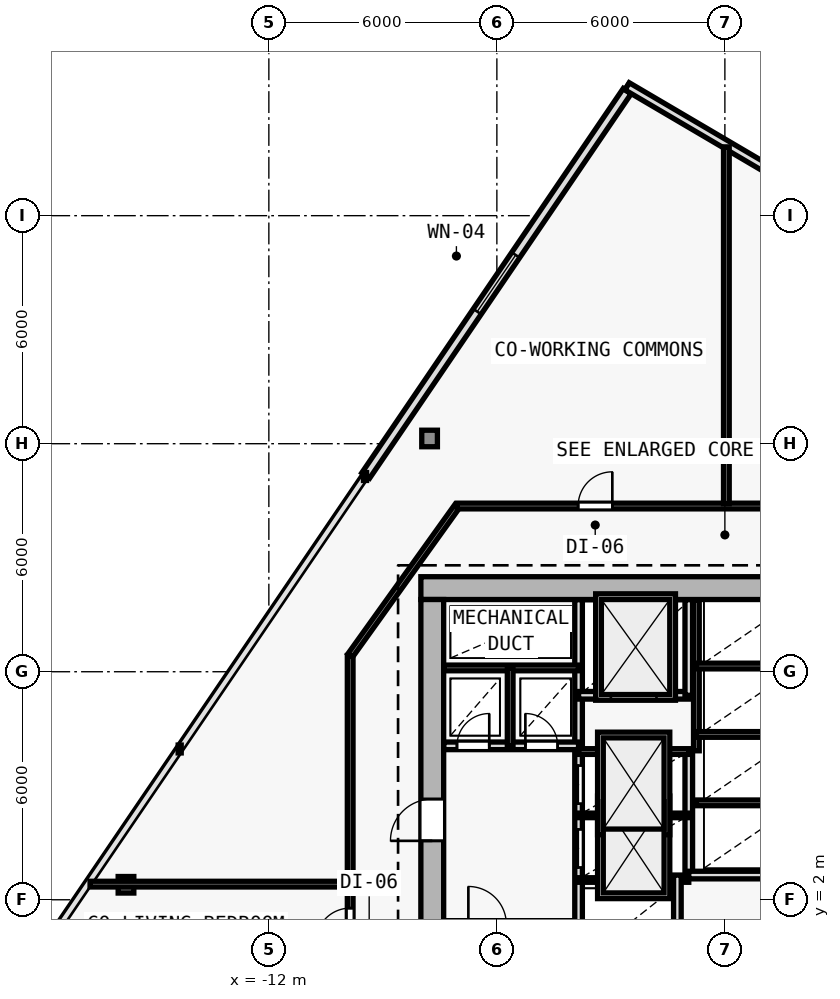
"""IFC4 building model, lengths in metres.
Left out: names, types, materials, properties, quantities, classifications, styles, units other than length and angle.
Written with IfcOpenShell. Run it as: python <this file> out.ifc"""

import sys

from ifc_helpers import new_model, si_unit, direction, frame, frame_2d, origin, origin_2d, place, context, subcontext, project, spatial, rectangle, i_section, extrude, element, fill, save


model = new_model("IFC4")
c1 = context("Model", 3, precision=1e-05, world=origin(), true_north=direction((0.0, 1.0)))
c2 = subcontext(c1, "Body", "Model", "MODEL_VIEW")
j1 = project(units=[si_unit("LENGTHUNIT", "METRE"), si_unit("PLANEANGLEUNIT", "RADIAN")], contexts=[c1])
p1 = place(None, origin())
s1 = spatial("IfcSite", under=j1, at=p1, CompositionType="ELEMENT")
p2 = place(p1, origin())
s2 = spatial("IfcBuilding", under=s1, at=p2, CompositionType="ELEMENT")
p3 = place(p2, frame((0.0, 0.0, 51.6)))
s3 = spatial("IfcBuildingStorey", under=s2, at=p3, CompositionType="ELEMENT", Elevation=51.6)
for number, where, z_axis, x_axis in (
    (1, (-7.7, 10.2, 0.0), (0.0, 0.0, 1.0), (1.0, 0.0, 0.0)),
    (2, (-7.7, 2.0, 0.0), (0.0, 0.0, 1.0), (1.0, 0.0, 0.0)),
):
    element("IfcColumn", number, at=place(p3, frame(where, z_axis=z_axis, x_axis=x_axis)), inside=s3, PredefinedType="COLUMN", context=c2, shape_type="SweptSolid", body=[
        extrude(i_section(OverallWidth=0.416, OverallDepth=0.446, WebThickness=0.025, FlangeThickness=0.04, FilletRadius=0.015, at=origin_2d()), origin(), (0.0, 0.0, 1.0), 3.6),
    ])
p4 = place(p3, frame((-7.771, 14.137, 0.005), z_axis=(0.008842562123, -0.00251672922, 0.999957736691), x_axis=(0.273743828055, 0.961802639112, 0.0)))
e3 = element("IfcColumn", 3, at=p4, inside=s3, PredefinedType="COLUMN", context=c2, shape_type="SweptSolid", body=[
    extrude(i_section(OverallWidth=0.412, OverallDepth=0.435, WebThickness=0.023, FlangeThickness=0.037, FilletRadius=0.015, at=origin_2d()), origin(), (0.0, 0.0, 1.0), 3.589),
])
p5 = place(p3, frame((-15.759, 2.394, 0.005), z_axis=(0.017002405671, 0.009589356798, 0.999809463067), x_axis=(-0.491253415567, 0.871016694268, 0.0)))
e4 = element("IfcColumn", 4, at=p5, inside=s3, PredefinedType="COLUMN", context=c2, shape_type="SweptSolid", body=[
    extrude(i_section(OverallWidth=0.412, OverallDepth=0.435, WebThickness=0.023, FlangeThickness=0.037, FilletRadius=0.015, at=origin_2d()), origin(), (0.0, 0.0, 1.0), 3.59),
])
p6 = place(p3, frame((-9.451, 13.163, 0.0), z_axis=(0.0, 0.0, 1.0), x_axis=(0.562478152622, 0.826812147844, 0.0)))
e5 = element("IfcWall", 5, at=p6, inside=s3, PredefinedType="SOLIDWALL", context=c2, shape_type="SweptSolid", body=[
    extrude(rectangle(XDim=12.232, YDim=0.25, at=frame_2d((6.116, 0.0))), origin(), (0.0, 0.0, 1.0), 3.35),
])
p7 = place(p6, frame((5.216, 0.0, 0.62)))
e6 = element("IfcOpeningElement", 6, at=p7, cuts=e5, PredefinedType="OPENING", context=c2, shape_type="SweptSolid", body=[
    extrude(rectangle(XDim=1.8, YDim=2.1, at=frame_2d((0.9, 1.05))), frame((0.0, 0.135, 0.0), z_axis=(0.0, -1.0, 0.0), x_axis=(1.0, 0.0, 0.0)), (0.0, 0.0, 1.0), 0.27),
])
p8 = place(p3, frame((-2.572, 23.403, 0.0), z_axis=(0.0, 0.0, 1.0), x_axis=(0.862137551275, -0.506674296449, 0.0)))
e7 = element("IfcWall", 7, at=p8, inside=s3, PredefinedType="SOLIDWALL", context=c2, shape_type="SweptSolid", body=[
    extrude(rectangle(XDim=5.307, YDim=0.22, at=frame_2d((2.654, 0.0))), origin(), (0.0, 0.0, 1.0), 3.35),
])
p9 = place(p3, frame((8.0, 10.2, 0.0), z_axis=(0.0, 0.0, 1.0), x_axis=(-1.0, 0.0, 0.0)))
e8 = element("IfcWall", 8, at=p9, inside=s3, PredefinedType="SHEAR", context=c2, shape_type="SweptSolid", body=[
    extrude(rectangle(XDim=16.0, YDim=0.6, at=frame_2d((8.0, 0.0))), origin(), (0.0, 0.0, 1.0), 3.35),
])
p10 = place(p9, frame((4.45, 0.0, 0.0)))
e9 = element("IfcOpeningElement", 9, at=p10, cuts=e8, PredefinedType="OPENING", context=c2, shape_type="SweptSolid", body=[
    extrude(rectangle(XDim=1.1, YDim=2.15, at=frame_2d((0.55, 1.075))), frame((0.0, 0.31, 0.0), z_axis=(0.0, -1.0, 0.0), x_axis=(1.0, 0.0, 0.0)), (0.0, 0.0, 1.0), 0.62),
])
p11 = place(p3, frame((-7.7, -9.1, 0.0), z_axis=(0.0, 0.0, 1.0), x_axis=(0.0, 1.0, 0.0)))
e10 = element("IfcWall", 10, at=p11, inside=s3, PredefinedType="SHEAR", context=c2, shape_type="SweptSolid", body=[
    extrude(rectangle(XDim=19.0, YDim=0.6, at=frame_2d((9.5, 0.0))), origin(), (0.0, 0.0, 1.0), 3.35),
])
p12 = place(p11, frame((12.65, 0.0, 0.0)))
e11 = element("IfcOpeningElement", 11, at=p12, cuts=e10, PredefinedType="OPENING", context=c2, shape_type="SweptSolid", body=[
    extrude(rectangle(XDim=1.1, YDim=2.15, at=frame_2d((0.55, 1.075))), frame((0.0, 0.31, 0.0), z_axis=(0.0, -1.0, 0.0), x_axis=(1.0, 0.0, 0.0)), (0.0, 0.0, 1.0), 0.62),
])
p13 = place(p3, frame((-3.85, 1.35, 0.0), z_axis=(0.0, 0.0, 1.0), x_axis=(0.0, 1.0, 0.0)))
e12 = element("IfcWall", 12, at=p13, inside=s3, PredefinedType="SOLIDWALL", context=c2, shape_type="SweptSolid", body=[
    extrude(rectangle(XDim=8.545, YDim=0.2, at=frame_2d((4.272, 0.0))), origin(), (0.0, 0.0, 1.0), 3.35),
])
p14 = place(p13, frame((1.5, 0.0, 0.0)))
e13 = element("IfcOpeningElement", 13, at=p14, cuts=e12, PredefinedType="OPENING", context=c2, shape_type="SweptSolid", body=[
    extrude(rectangle(XDim=1.0, YDim=2.15, at=frame_2d((0.5, 1.075))), frame((0.0, 0.11, 0.0), z_axis=(0.0, -1.0, 0.0), x_axis=(1.0, 0.0, 0.0)), (0.0, 0.0, 1.0), 0.22),
])
p15 = place(p13, frame((3.18, 0.0, 0.0)))
e14 = element("IfcOpeningElement", 14, at=p15, cuts=e12, PredefinedType="OPENING", context=c2, shape_type="SweptSolid", body=[
    extrude(rectangle(XDim=1.0, YDim=2.15, at=frame_2d((0.5, 1.075))), frame((0.0, 0.11, 0.0), z_axis=(0.0, -1.0, 0.0), x_axis=(1.0, 0.0, 0.0)), (0.0, 0.0, 1.0), 0.22),
])
p16 = place(p3, frame((-7.395, 6.05, 0.0), z_axis=(0.0, 0.0, 1.0), x_axis=(1.0, 0.0, 0.0)))
e15 = element("IfcWall", 15, at=p16, inside=s3, PredefinedType="SOLIDWALL", context=c2, shape_type="SweptSolid", body=[
    extrude(rectangle(XDim=3.545, YDim=0.2, at=frame_2d((1.772, 0.0))), origin(), (0.0, 0.0, 1.0), 3.35),
])
p17 = place(p16, frame((0.345, 0.0, 0.0)))
e16 = element("IfcOpeningElement", 16, at=p17, cuts=e15, PredefinedType="OPENING", context=c2, shape_type="SweptSolid", body=[
    extrude(rectangle(XDim=0.85, YDim=2.1, at=frame_2d((0.425, 1.05))), frame((0.0, 0.11, 0.0), z_axis=(0.0, -1.0, 0.0), x_axis=(1.0, 0.0, 0.0)), (0.0, 0.0, 1.0), 0.22),
])
p18 = place(p16, frame((2.145, 0.0, 0.0)))
e17 = element("IfcOpeningElement", 17, at=p18, cuts=e15, PredefinedType="OPENING", context=c2, shape_type="SweptSolid", body=[
    extrude(rectangle(XDim=0.85, YDim=2.1, at=frame_2d((0.425, 1.05))), frame((0.0, 0.11, 0.0), z_axis=(0.0, -1.0, 0.0), x_axis=(1.0, 0.0, 0.0)), (0.0, 0.0, 1.0), 0.22),
])
p19 = place(p3, frame((-7.395, 8.1, 0.0), z_axis=(0.0, 0.0, 1.0), x_axis=(1.0, 0.0, 0.0)))
e18 = element("IfcWall", 18, at=p19, inside=s3, PredefinedType="PARTITIONING", context=c2, shape_type="SweptSolid", body=[
    extrude(rectangle(XDim=3.545, YDim=0.15, at=frame_2d((1.772, 0.0))), origin(), (0.0, 0.0, 1.0), 3.35),
])
p20 = place(p3, frame((-5.65, 6.05, 0.0), z_axis=(0.0, 0.0, 1.0), x_axis=(0.0, 1.0, 0.0)))
e19 = element("IfcWall", 19, at=p20, inside=s3, PredefinedType="PARTITIONING", context=c2, shape_type="SweptSolid", body=[
    extrude(rectangle(XDim=2.05, YDim=0.15, at=frame_2d((1.025, 0.0))), origin(), (0.0, 0.0, 1.0), 3.35),
])
p21 = place(p3, frame((-0.95, 2.65, 0.0), z_axis=(0.0, 0.0, 1.0), x_axis=(0.0, 1.0, 0.0)))
e20 = element("IfcWall", 20, at=p21, inside=s3, PredefinedType="SOLIDWALL", context=c2, shape_type="SweptSolid", body=[
    extrude(rectangle(XDim=3.27, YDim=0.2, at=frame_2d((1.635, 0.0))), origin(), (0.0, 0.0, 1.0), 3.35),
])
for number, where, z_axis, x_axis in (
    (21, (-3.85, 2.52, 0.0), (0.0, 0.0, 1.0), (1.0, 0.0, 0.0)),
    (22, (-3.85, 4.22, 0.0), (0.0, 0.0, 1.0), (1.0, 0.0, 0.0)),
):
    element("IfcWall", number, at=place(p3, frame(where, z_axis=z_axis, x_axis=x_axis)), inside=s3, PredefinedType="PARTITIONING", context=c2, shape_type="SweptSolid", body=[
        extrude(rectangle(XDim=2.9, YDim=0.12, at=frame_2d((1.45, 0.0))), origin(), (0.0, 0.0, 1.0), 3.35),
    ])
p22 = place(p3, frame((-3.85, 5.9, 0.0), z_axis=(0.0, 0.0, 1.0), x_axis=(1.0, 0.0, 0.0)))
e23 = element("IfcWall", 23, at=p22, inside=s3, PredefinedType="PARTITIONING", context=c2, shape_type="SweptSolid", body=[
    extrude(rectangle(XDim=2.9, YDim=0.15, at=frame_2d((1.45, 0.0))), origin(), (0.0, 0.0, 1.0), 3.35),
])
p23 = place(p3, frame((-3.85, 7.38, 0.0), z_axis=(0.0, 0.0, 1.0), x_axis=(1.0, 0.0, 0.0)))
e24 = element("IfcWall", 24, at=p23, inside=s3, PredefinedType="SOLIDWALL", context=c2, shape_type="SweptSolid", body=[
    extrude(rectangle(XDim=2.9, YDim=0.2, at=frame_2d((1.45, 0.0))), origin(), (0.0, 0.0, 1.0), 3.35),
])
p24 = place(p23, frame((0.85, 0.0, 0.0)))
e25 = element("IfcOpeningElement", 25, at=p24, cuts=e24, PredefinedType="OPENING", context=c2, shape_type="SweptSolid", body=[
    extrude(rectangle(XDim=1.2, YDim=2.2, at=frame_2d((0.6, 1.1))), frame((0.0, 0.11, 0.0), z_axis=(0.0, -1.0, 0.0), x_axis=(1.0, 0.0, 0.0)), (0.0, 0.0, 1.0), 0.22),
])
p25 = place(p3, frame((-0.95, 7.38, 0.0), z_axis=(0.0, 0.0, 1.0), x_axis=(0.0, 1.0, 0.0)))
e26 = element("IfcWall", 26, at=p25, inside=s3, PredefinedType="SOLIDWALL", context=c2, shape_type="SweptSolid", body=[
    extrude(rectangle(XDim=2.515, YDim=0.2, at=frame_2d((1.258, 0.0))), origin(), (0.0, 0.0, 1.0), 3.35),
])
p26 = place(p3, frame((-1.25, -6.05, 0.0), z_axis=(0.0, 0.0, 1.0), x_axis=(0.0, 1.0, 0.0)))
e27 = element("IfcWall", 27, at=p26, inside=s3, PredefinedType="SOLIDWALL", context=c2, shape_type="SweptSolid", body=[
    extrude(rectangle(XDim=8.7, YDim=0.2, at=frame_2d((4.35, 0.0))), origin(), (0.0, 0.0, 1.0), 3.35),
])
p27 = place(p3, frame((-0.95, 2.65, 0.0), z_axis=(0.0, 0.0, 1.0), x_axis=(1.0, 0.0, 0.0)))
e28 = element("IfcWall", 28, at=p27, inside=s3, PredefinedType="SOLIDWALL", context=c2, shape_type="SweptSolid", body=[
    extrude(rectangle(XDim=2.9, YDim=0.2, at=frame_2d((1.45, 0.0))), origin(), (0.0, 0.0, 1.0), 3.35),
])
p28 = place(p3, frame((-0.75, 5.92, 0.0), z_axis=(0.0, 0.0, 1.0), x_axis=(0.0, 1.0, 0.0)))
e29 = element("IfcWall", 29, at=p28, inside=s3, PredefinedType="PARTITIONING", context=c2, shape_type="SweptSolid", body=[
    extrude(rectangle(XDim=3.975, YDim=0.15, at=frame_2d((1.988, 0.0))), origin(), (0.0, 0.0, 1.0), 3.35),
])
for number, where, z_axis, x_axis in (
    (30, (-0.75, 4.55, 0.0), (0.0, 0.0, 1.0), (1.0, 0.0, 0.0)),
    (31, (-0.75, 6.35, 0.0), (0.0, 0.0, 1.0), (1.0, 0.0, 0.0)),
    (32, (-0.75, 8.15, 0.0), (0.0, 0.0, 1.0), (1.0, 0.0, 0.0)),
):
    element("IfcWall", number, at=place(p3, frame(where, z_axis=z_axis, x_axis=x_axis)), inside=s3, PredefinedType="PARTITIONING", context=c2, shape_type="SweptSolid", body=[
        extrude(rectangle(XDim=2.7, YDim=0.15, at=frame_2d((1.35, 0.0))), origin(), (0.0, 0.0, 1.0), 3.35),
    ])
p29 = place(p3, frame((-9.86, -11.56, 0.0), z_axis=(0.0, 0.0, 1.0), x_axis=(0.0, 1.0, 0.0)))
e33 = element("IfcWall", 33, at=p29, inside=s3, PredefinedType="PARTITIONING", context=c2, shape_type="SweptSolid", body=[
    extrude(rectangle(XDim=19.986, YDim=0.15, at=frame_2d((9.993, 0.0))), origin(), (0.0, 0.0, 1.0), 2.609),
])
p30 = place(p29, frame((9.766, 0.0, 0.0)))
e34 = element("IfcOpeningElement", 34, at=p30, cuts=e33, PredefinedType="OPENING", context=c2, shape_type="SweptSolid", body=[
    extrude(rectangle(XDim=0.9, YDim=2.1, at=frame_2d((0.45, 1.05))), frame((0.0, 0.085, 0.0), z_axis=(0.0, -1.0, 0.0), x_axis=(1.0, 0.0, 0.0)), (0.0, 0.0, 1.0), 0.17),
])
p31 = place(p29, frame((6.615, 0.0, 0.0)))
e35 = element("IfcOpeningElement", 35, at=p31, cuts=e33, PredefinedType="OPENING", context=c2, shape_type="SweptSolid", body=[
    extrude(rectangle(XDim=0.9, YDim=2.1, at=frame_2d((0.45, 1.05))), frame((0.0, 0.085, 0.0), z_axis=(0.0, -1.0, 0.0), x_axis=(1.0, 0.0, 0.0)), (0.0, 0.0, 1.0), 0.17),
])
p32 = place(p29, frame((3.428, 0.0, 0.0)))
e36 = element("IfcOpeningElement", 36, at=p32, cuts=e33, PredefinedType="OPENING", context=c2, shape_type="SweptSolid", body=[
    extrude(rectangle(XDim=0.9, YDim=2.1, at=frame_2d((0.45, 1.05))), frame((0.0, 0.085, 0.0), z_axis=(0.0, -1.0, 0.0), x_axis=(1.0, 0.0, 0.0)), (0.0, 0.0, 1.0), 0.17),
])
p33 = place(p29, frame((0.764, 0.0, 0.0)))
e37 = element("IfcOpeningElement", 37, at=p33, cuts=e33, PredefinedType="OPENING", context=c2, shape_type="SweptSolid", body=[
    extrude(rectangle(XDim=0.9, YDim=2.1, at=frame_2d((0.45, 1.05))), frame((0.0, 0.085, 0.0), z_axis=(0.0, -1.0, 0.0), x_axis=(1.0, 0.0, 0.0)), (0.0, 0.0, 1.0), 0.17),
])
p34 = place(p29, frame((12.44, 0.0, 0.0)))
e38 = element("IfcOpeningElement", 38, at=p34, cuts=e33, PredefinedType="OPENING", context=c2, shape_type="SweptSolid", body=[
    extrude(rectangle(XDim=0.9, YDim=2.1, at=frame_2d((0.45, 1.05))), frame((0.0, 0.085, 0.0), z_axis=(0.0, -1.0, 0.0), x_axis=(1.0, 0.0, 0.0)), (0.0, 0.0, 1.0), 0.17),
])
p35 = place(p3, frame((-9.86, 8.426, 0.0), z_axis=(0.0, 0.0, 1.0), x_axis=(0.582449511476, 0.812866881218, 0.0)))
e39 = element("IfcWall", 39, at=p35, inside=s3, PredefinedType="PARTITIONING", context=c2, shape_type="SweptSolid", body=[
    extrude(rectangle(XDim=4.84, YDim=0.15, at=frame_2d((2.42, 0.0))), origin(), (0.0, 0.0, 1.0), 2.725),
])
p36 = place(p3, frame((-7.041, 12.36, 0.0), z_axis=(0.0, 0.0, 1.0), x_axis=(1.0, 0.0, 0.0)))
e40 = element("IfcWall", 40, at=p36, inside=s3, PredefinedType="PARTITIONING", context=c2, shape_type="SweptSolid", body=[
    extrude(rectangle(XDim=14.082, YDim=0.15, at=frame_2d((7.041, 0.0))), origin(), (0.0, 0.0, 1.0), 3.35),
])
p37 = place(p36, frame((10.042, 0.0, 0.0)))
e41 = element("IfcOpeningElement", 41, at=p37, cuts=e40, PredefinedType="OPENING", context=c2, shape_type="SweptSolid", body=[
    extrude(rectangle(XDim=0.9, YDim=2.1, at=frame_2d((0.45, 1.05))), frame((0.0, 0.085, 0.0), z_axis=(0.0, -1.0, 0.0), x_axis=(1.0, 0.0, 0.0)), (0.0, 0.0, 1.0), 0.17),
])
p38 = place(p36, frame((3.179, 0.0, 0.0)))
e42 = element("IfcOpeningElement", 42, at=p38, cuts=e40, PredefinedType="OPENING", context=c2, shape_type="SweptSolid", body=[
    extrude(rectangle(XDim=0.9, YDim=2.1, at=frame_2d((0.45, 1.05))), frame((0.0, 0.085, 0.0), z_axis=(0.0, -1.0, 0.0), x_axis=(1.0, 0.0, 0.0)), (0.0, 0.0, 1.0), 0.17),
])
p39 = place(p3, frame((-9.92, 2.411, 0.0), z_axis=(0.0, 0.0, 1.0), x_axis=(-1.0, 0.0, 0.0)))
e43 = element("IfcWall", 43, at=p39, inside=s3, PredefinedType="PARTITIONING", context=c2, shape_type="SweptSolid", body=[
    extrude(rectangle(XDim=6.785, YDim=0.15, at=frame_2d((3.392, 0.0))), origin(), (0.0, 0.0, 1.0), 2.725),
])
p40 = place(p3, frame((0.039, 12.42, 0.0), z_axis=(0.0, 0.0, 1.0), x_axis=(0.0, 1.0, 0.0)))
e44 = element("IfcWall", 44, at=p40, inside=s3, PredefinedType="PARTITIONING", context=c2, shape_type="SweptSolid", body=[
    extrude(rectangle(XDim=9.39, YDim=0.15, at=frame_2d((4.695, 0.0))), origin(), (0.0, 0.0, 1.0), 2.735),
])
p41 = place(p7, origin())
e45 = element("IfcWindow", 45, at=p41, inside=s3, PartitioningType="SINGLE_PANEL", PredefinedType="WINDOW", context=c2, shape_type="SweptSolid", body=[
    extrude(rectangle(XDim=1.8, YDim=2.1, at=frame_2d((0.9, 1.05))), frame((0.0, 0.03, 0.0), z_axis=(0.0, -1.0, 0.0), x_axis=(1.0, 0.0, 0.0)), (0.0, 0.0, 1.0), 0.06),
])
fill(e6, e45)
p42 = place(p12, origin())
e46 = element("IfcDoor", 46, at=p42, inside=s3, OperationType="SINGLE_SWING_LEFT", PredefinedType="DOOR", context=c2, shape_type="SweptSolid", body=[
    extrude(rectangle(XDim=1.1, YDim=2.15, at=frame_2d((0.55, 1.075))), frame((0.0, 0.025, 0.0), z_axis=(0.0, -1.0, 0.0), x_axis=(1.0, 0.0, 0.0)), (0.0, 0.0, 1.0), 0.05),
])
fill(e11, e46)
p43 = place(p17, origin())
e47 = element("IfcDoor", 47, at=p43, inside=s3, OperationType="SINGLE_SWING_RIGHT", PredefinedType="DOOR", context=c2, shape_type="SweptSolid", body=[
    extrude(rectangle(XDim=0.85, YDim=2.1, at=frame_2d((0.425, 1.05))), frame((0.0, 0.025, 0.0), z_axis=(0.0, -1.0, 0.0), x_axis=(1.0, 0.0, 0.0)), (0.0, 0.0, 1.0), 0.05),
])
fill(e16, e47)
p44 = place(p18, origin())
e48 = element("IfcDoor", 48, at=p44, inside=s3, OperationType="SINGLE_SWING_LEFT", PredefinedType="DOOR", context=c2, shape_type="SweptSolid", body=[
    extrude(rectangle(XDim=0.85, YDim=2.1, at=frame_2d((0.425, 1.05))), frame((0.0, 0.025, 0.0), z_axis=(0.0, -1.0, 0.0), x_axis=(1.0, 0.0, 0.0)), (0.0, 0.0, 1.0), 0.05),
])
fill(e17, e48)
p45 = place(p24, origin())
e49 = element("IfcDoor", 49, at=p45, inside=s3, OperationType="DOUBLE_DOOR_SLIDING", PredefinedType="DOOR", context=c2, shape_type="SweptSolid", body=[
    extrude(rectangle(XDim=1.2, YDim=2.2, at=frame_2d((0.6, 1.1))), frame((0.0, 0.025, 0.0), z_axis=(0.0, -1.0, 0.0), x_axis=(1.0, 0.0, 0.0)), (0.0, 0.0, 1.0), 0.05),
])
fill(e25, e49)
p46 = place(p14, origin())
e50 = element("IfcDoor", 50, at=p46, inside=s3, OperationType="DOUBLE_DOOR_SLIDING", PredefinedType="DOOR", context=c2, shape_type="SweptSolid", body=[
    extrude(rectangle(XDim=1.0, YDim=2.15, at=frame_2d((0.5, 1.075))), frame((0.0, 0.025, 0.0), z_axis=(0.0, -1.0, 0.0), x_axis=(1.0, 0.0, 0.0)), (0.0, 0.0, 1.0), 0.05),
])
fill(e13, e50)
p47 = place(p15, origin())
e51 = element("IfcDoor", 51, at=p47, inside=s3, OperationType="DOUBLE_DOOR_SLIDING", PredefinedType="DOOR", context=c2, shape_type="SweptSolid", body=[
    extrude(rectangle(XDim=1.0, YDim=2.15, at=frame_2d((0.5, 1.075))), frame((0.0, 0.025, 0.0), z_axis=(0.0, -1.0, 0.0), x_axis=(1.0, 0.0, 0.0)), (0.0, 0.0, 1.0), 0.05),
])
fill(e14, e51)
p48 = place(p38, origin())
e52 = element("IfcDoor", 52, at=p48, inside=s3, OperationType="SINGLE_SWING_RIGHT", PredefinedType="DOOR", context=c2, shape_type="SweptSolid", body=[
    extrude(rectangle(XDim=0.9, YDim=2.1, at=frame_2d((0.45, 1.05))), frame((0.0, 0.025, 0.0), z_axis=(0.0, -1.0, 0.0), x_axis=(1.0, 0.0, 0.0)), (0.0, 0.0, 1.0), 0.05),
])
fill(e42, e52)
p49 = place(p34, origin())
e53 = element("IfcDoor", 53, at=p49, inside=s3, OperationType="SINGLE_SWING_LEFT", PredefinedType="DOOR", context=c2, shape_type="SweptSolid", body=[
    extrude(rectangle(XDim=0.9, YDim=2.1, at=frame_2d((0.45, 1.05))), frame((0.0, 0.025, 0.0), z_axis=(0.0, -1.0, 0.0), x_axis=(1.0, 0.0, 0.0)), (0.0, 0.0, 1.0), 0.05),
])
fill(e38, e53)
save(model, sys.argv[1])
